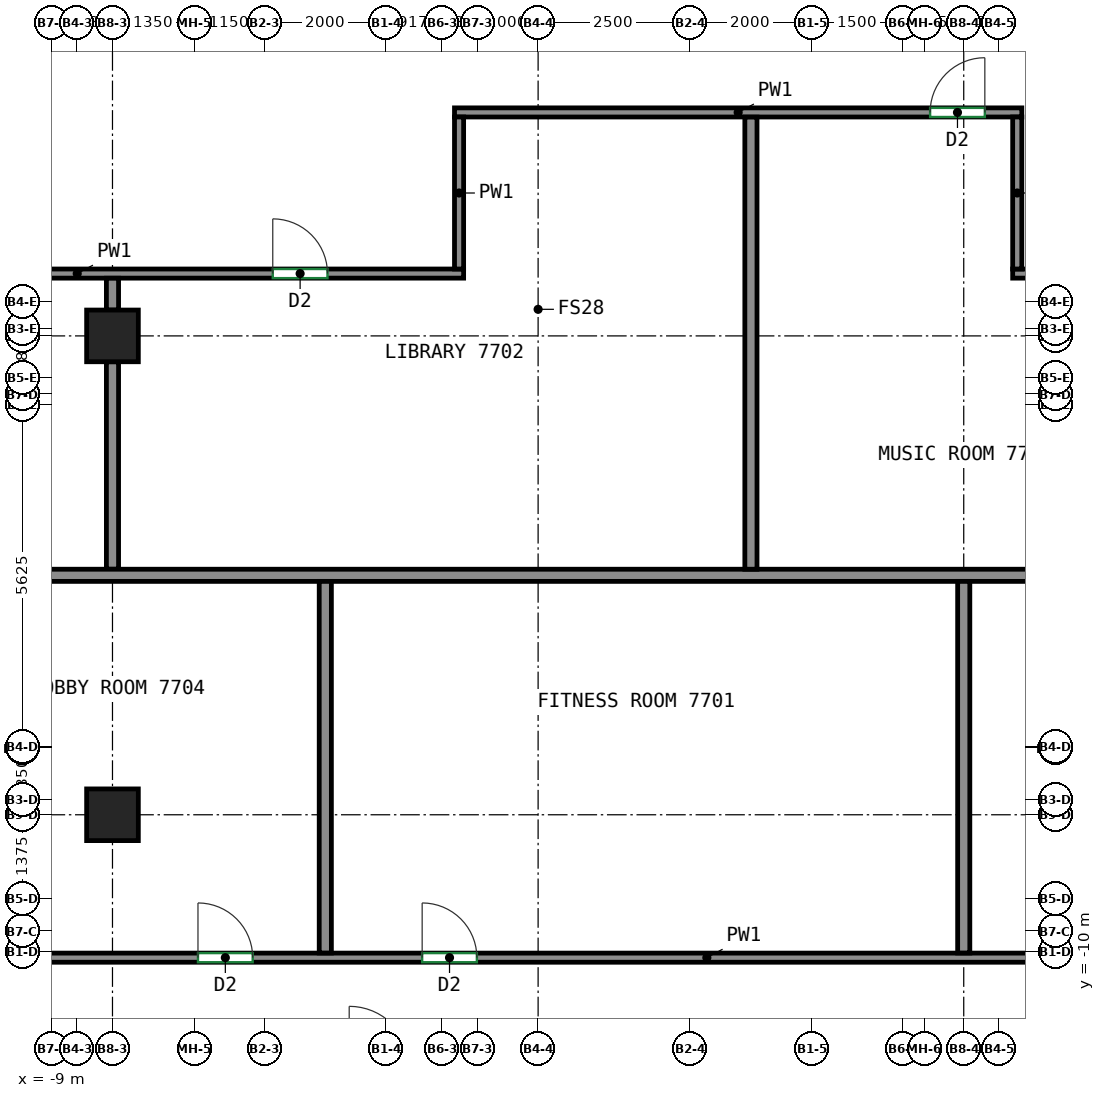
"""IFC4 building model, lengths in metres.
Left out: names, types, materials, properties, quantities, classifications, styles, units other than length and angle.
Written with IfcOpenShell. Run it as: python <this file> out.ifc"""

import sys

from ifc_helpers import new_model, si_unit, direction, frame, frame_2d, origin, origin_2d, place, context, subcontext, project, spatial, rectangle, extrude, source, transform, mapped, element, fill, save


model = new_model("IFC4")
c1 = context("Model", 3, precision=1e-05, world=origin(), true_north=direction((0.0, 1.0)))
c2 = subcontext(c1, "Body", "Model", "MODEL_VIEW")
j1 = project(units=[si_unit("LENGTHUNIT", "METRE"), si_unit("PLANEANGLEUNIT", "RADIAN")], contexts=[c1])
p1 = place(None, origin())
s1 = spatial("IfcSite", under=j1, at=p1, CompositionType="ELEMENT")
p2 = place(p1, origin())
s2 = spatial("IfcBuilding", under=s1, at=p2, CompositionType="ELEMENT")
p3 = place(p2, frame((0.0, 0.0, 308.6)))
s3 = spatial("IfcBuildingStorey", under=s2, at=p3, CompositionType="ELEMENT", Elevation=308.6)
m1 = source(origin(), c2, "Body", "SweptSolid", [
    extrude(rectangle(XDim=0.85, YDim=0.85, at=origin_2d()), origin(), (0.0, 0.0, 1.0), 3.12),
])
for number, where, z_axis, x_axis in (
    (1, (-8.0, -7.75, 0.0), (0.0, 0.0, 1.0), (1.0, 0.0, 0.0)),
    (2, (-8.0, 0.125, 0.0), (0.0, 0.0, 1.0), (1.0, 0.0, 0.0)),
):
    element("IfcColumn", number, at=place(p3, frame(where, z_axis=z_axis, x_axis=x_axis)), inside=s3, PredefinedType="COLUMN", context=c2, shape_type="MappedRepresentation", body=[
        mapped(m1, transform((0.0, 0.0, 0.0))),
    ])
p4 = place(p3, frame((-14.935, 1.15, 0.0), z_axis=(0.0, 0.0, 1.0), x_axis=(1.0, 0.0, 0.0)))
e3 = element("IfcWall", 3, at=p4, inside=s3, PredefinedType="PARTITIONING", context=c2, shape_type="SweptSolid", body=[
    extrude(rectangle(XDim=12.71, YDim=0.15, at=frame_2d((6.355, 0.0))), origin(), (0.0, 0.0, 1.0), 3.12),
])
p5 = place(p4, frame((3.426, 0.0, 0.0)))
e4 = element("IfcOpeningElement", 4, at=p5, cuts=e3, PredefinedType="OPENING", context=c2, shape_type="SweptSolid", body=[
    extrude(rectangle(XDim=0.9, YDim=2.1, at=frame_2d((0.45, 1.05))), frame((0.0, 0.085, 0.0), z_axis=(0.0, -1.0, 0.0), x_axis=(1.0, 0.0, 0.0)), (0.0, 0.0, 1.0), 0.17),
])
p6 = place(p4, frame((9.571, 0.0, 0.0)))
e5 = element("IfcOpeningElement", 5, at=p6, cuts=e3, PredefinedType="OPENING", context=c2, shape_type="SweptSolid", body=[
    extrude(rectangle(XDim=0.9, YDim=2.1, at=frame_2d((0.45, 1.05))), frame((0.0, 0.085, 0.0), z_axis=(0.0, -1.0, 0.0), x_axis=(1.0, 0.0, 0.0)), (0.0, 0.0, 1.0), 0.17),
])
p7 = place(p3, frame((-13.55, -10.1, 0.0), z_axis=(0.0, 0.0, 1.0), x_axis=(1.0, 0.0, 0.0)))
e6 = element("IfcWall", 6, at=p7, inside=s3, PredefinedType="PARTITIONING", context=c2, shape_type="SweptSolid", body=[
    extrude(rectangle(XDim=30.65, YDim=0.15, at=frame_2d((15.325, 0.0))), origin(), (0.0, 0.0, 1.0), 3.12),
])
p8 = place(p7, frame((6.956, 0.0, 0.0)))
e7 = element("IfcOpeningElement", 7, at=p8, cuts=e6, PredefinedType="OPENING", context=c2, shape_type="SweptSolid", body=[
    extrude(rectangle(XDim=0.9, YDim=2.1, at=frame_2d((0.45, 1.05))), frame((0.0, 0.085, 0.0), z_axis=(0.0, -1.0, 0.0), x_axis=(1.0, 0.0, 0.0)), (0.0, 0.0, 1.0), 0.17),
])
p9 = place(p7, frame((10.643, 0.0, 0.0)))
e8 = element("IfcOpeningElement", 8, at=p9, cuts=e6, PredefinedType="OPENING", context=c2, shape_type="SweptSolid", body=[
    extrude(rectangle(XDim=0.9, YDim=2.1, at=frame_2d((0.45, 1.05))), frame((0.0, 0.085, 0.0), z_axis=(0.0, -1.0, 0.0), x_axis=(1.0, 0.0, 0.0)), (0.0, 0.0, 1.0), 0.17),
])
p10 = place(p7, frame((24.155, 0.0, 0.0)))
e9 = element("IfcOpeningElement", 9, at=p10, cuts=e6, PredefinedType="OPENING", context=c2, shape_type="SweptSolid", body=[
    extrude(rectangle(XDim=0.9, YDim=2.1, at=frame_2d((0.45, 1.05))), frame((0.0, 0.085, 0.0), z_axis=(0.0, -1.0, 0.0), x_axis=(1.0, 0.0, 0.0)), (0.0, 0.0, 1.0), 0.17),
])
p11 = place(p3, frame((-2.375, 3.8, 0.0), z_axis=(0.0, 0.0, 1.0), x_axis=(1.0, 0.0, 0.0)))
e10 = element("IfcWall", 10, at=p11, inside=s3, PredefinedType="PARTITIONING", context=c2, shape_type="SweptSolid", body=[
    extrude(rectangle(XDim=9.33, YDim=0.15, at=frame_2d((4.665, 0.0))), origin(), (0.0, 0.0, 1.0), 3.12),
])
p12 = place(p11, frame((7.822, 0.0, 0.0)))
e11 = element("IfcOpeningElement", 11, at=p12, cuts=e10, PredefinedType="OPENING", context=c2, shape_type="SweptSolid", body=[
    extrude(rectangle(XDim=0.9, YDim=2.1, at=frame_2d((0.45, 1.05))), frame((0.0, 0.085, 0.0), z_axis=(0.0, -1.0, 0.0), x_axis=(1.0, 0.0, 0.0)), (0.0, 0.0, 1.0), 0.17),
])
p13 = place(p3, frame((-2.3, 1.225, 0.0), z_axis=(0.0, 0.0, 1.0), x_axis=(0.0, 1.0, 0.0)))
e12 = element("IfcWall", 12, at=p13, inside=s3, PredefinedType="PARTITIONING", context=c2, shape_type="SweptSolid", body=[
    extrude(rectangle(XDim=2.5, YDim=0.15, at=frame_2d((1.25, 0.0))), origin(), (0.0, 0.0, 1.0), 3.12),
])
p14 = place(p3, frame((6.805, 1.15, 0.0), z_axis=(0.0, 0.0, 1.0), x_axis=(1.0, 0.0, 0.0)))
e13 = element("IfcWall", 13, at=p14, inside=s3, PredefinedType="PARTITIONING", context=c2, shape_type="SweptSolid", body=[
    extrude(rectangle(XDim=10.35, YDim=0.15, at=frame_2d((5.175, 0.0))), origin(), (0.0, 0.0, 1.0), 3.12),
])
p15 = place(p14, frame((6.623, 0.0, 0.0)))
e14 = element("IfcOpeningElement", 14, at=p15, cuts=e13, PredefinedType="OPENING", context=c2, shape_type="SweptSolid", body=[
    extrude(rectangle(XDim=0.9, YDim=2.1, at=frame_2d((0.45, 1.05))), frame((0.0, 0.085, 0.0), z_axis=(0.0, -1.0, 0.0), x_axis=(1.0, 0.0, 0.0)), (0.0, 0.0, 1.0), 0.17),
])
p16 = place(p3, frame((6.88, 3.725, 0.0), z_axis=(0.0, 0.0, 1.0), x_axis=(0.0, -1.0, 0.0)))
e15 = element("IfcWall", 15, at=p16, inside=s3, PredefinedType="PARTITIONING", context=c2, shape_type="SweptSolid", body=[
    extrude(rectangle(XDim=2.5, YDim=0.15, at=frame_2d((1.25, 0.0))), origin(), (0.0, 0.0, 1.0), 3.12),
])
p17 = place(p3, frame((-8.0, 0.55, 0.0), z_axis=(0.0, 0.0, 1.0), x_axis=(0.0, 1.0, 0.0)))
e16 = element("IfcWall", 16, at=p17, inside=s3, PredefinedType="PARTITIONING", context=c2, shape_type="SweptSolid", body=[
    extrude(rectangle(XDim=0.523, YDim=0.2, at=frame_2d((0.261, 0.0))), origin(), (0.0, 0.0, 1.0), 3.12),
])
p18 = place(p3, frame((-8.0, -3.712, 0.0), z_axis=(0.0, 0.0, 1.0), x_axis=(0.0, 1.0, 0.0)))
e17 = element("IfcWall", 17, at=p18, inside=s3, PredefinedType="PARTITIONING", context=c2, shape_type="SweptSolid", body=[
    extrude(rectangle(XDim=3.412, YDim=0.2, at=frame_2d((1.706, 0.0))), origin(), (0.0, 0.0, 1.0), 3.12),
])
p19 = place(p3, frame((-11.6, -3.812, 0.0), z_axis=(0.0, 0.0, 1.0), x_axis=(1.0, 0.0, 0.0)))
e18 = element("IfcWall", 18, at=p19, inside=s3, PredefinedType="PARTITIONING", context=c2, shape_type="SweptSolid", body=[
    extrude(rectangle(XDim=28.2, YDim=0.2, at=frame_2d((14.1, 0.0))), origin(), (0.0, 0.0, 1.0), 3.12),
])
p20 = place(p3, frame((2.5, -3.712, 0.0), z_axis=(0.0, 0.0, 1.0), x_axis=(0.0, 1.0, 0.0)))
e19 = element("IfcWall", 19, at=p20, inside=s3, PredefinedType="PARTITIONING", context=c2, shape_type="SweptSolid", body=[
    extrude(rectangle(XDim=7.435, YDim=0.2, at=frame_2d((3.717, 0.0))), origin(), (0.0, 0.0, 1.0), 3.12),
])
for number, where, z_axis, x_axis in (
    (20, (-4.5, -10.023, 0.0), (0.0, 0.0, 1.0), (0.0, 1.0, 0.0)),
    (21, (6.0, -10.023, 0.0), (0.0, 0.0, 1.0), (0.0, 1.0, 0.0)),
):
    element("IfcWall", number, at=place(p3, frame(where, z_axis=z_axis, x_axis=x_axis)), inside=s3, PredefinedType="PARTITIONING", context=c2, shape_type="SweptSolid", body=[
        extrude(rectangle(XDim=6.111, YDim=0.2, at=frame_2d((3.055, 0.0))), origin(), (0.0, 0.0, 1.0), 3.12),
    ])
p21 = place(p8, origin())
e22 = element("IfcDoor", 22, at=p21, inside=s3, OperationType="SINGLE_SWING_LEFT", PredefinedType="DOOR", context=c2, shape_type="SweptSolid", body=[
    extrude(rectangle(XDim=0.9, YDim=2.1, at=frame_2d((0.45, 1.05))), frame((0.0, 0.025, 0.0), z_axis=(0.0, -1.0, 0.0), x_axis=(1.0, 0.0, 0.0)), (0.0, 0.0, 1.0), 0.05),
])
fill(e7, e22)
p22 = place(p9, origin())
e23 = element("IfcDoor", 23, at=p22, inside=s3, OperationType="SINGLE_SWING_LEFT", PredefinedType="DOOR", context=c2, shape_type="SweptSolid", body=[
    extrude(rectangle(XDim=0.9, YDim=2.1, at=frame_2d((0.45, 1.05))), frame((0.0, 0.025, 0.0), z_axis=(0.0, -1.0, 0.0), x_axis=(1.0, 0.0, 0.0)), (0.0, 0.0, 1.0), 0.05),
])
fill(e8, e23)
p23 = place(p6, origin())
e24 = element("IfcDoor", 24, at=p23, inside=s3, OperationType="SINGLE_SWING_LEFT", PredefinedType="DOOR", context=c2, shape_type="SweptSolid", body=[
    extrude(rectangle(XDim=0.9, YDim=2.1, at=frame_2d((0.45, 1.05))), frame((0.0, 0.025, 0.0), z_axis=(0.0, -1.0, 0.0), x_axis=(1.0, 0.0, 0.0)), (0.0, 0.0, 1.0), 0.05),
])
fill(e5, e24)
p24 = place(p12, origin())
e25 = element("IfcDoor", 25, at=p24, inside=s3, OperationType="SINGLE_SWING_RIGHT", PredefinedType="DOOR", context=c2, shape_type="SweptSolid", body=[
    extrude(rectangle(XDim=0.9, YDim=2.1, at=frame_2d((0.45, 1.05))), frame((0.0, 0.025, 0.0), z_axis=(0.0, -1.0, 0.0), x_axis=(1.0, 0.0, 0.0)), (0.0, 0.0, 1.0), 0.05),
])
fill(e11, e25)
save(model, sys.argv[1])
